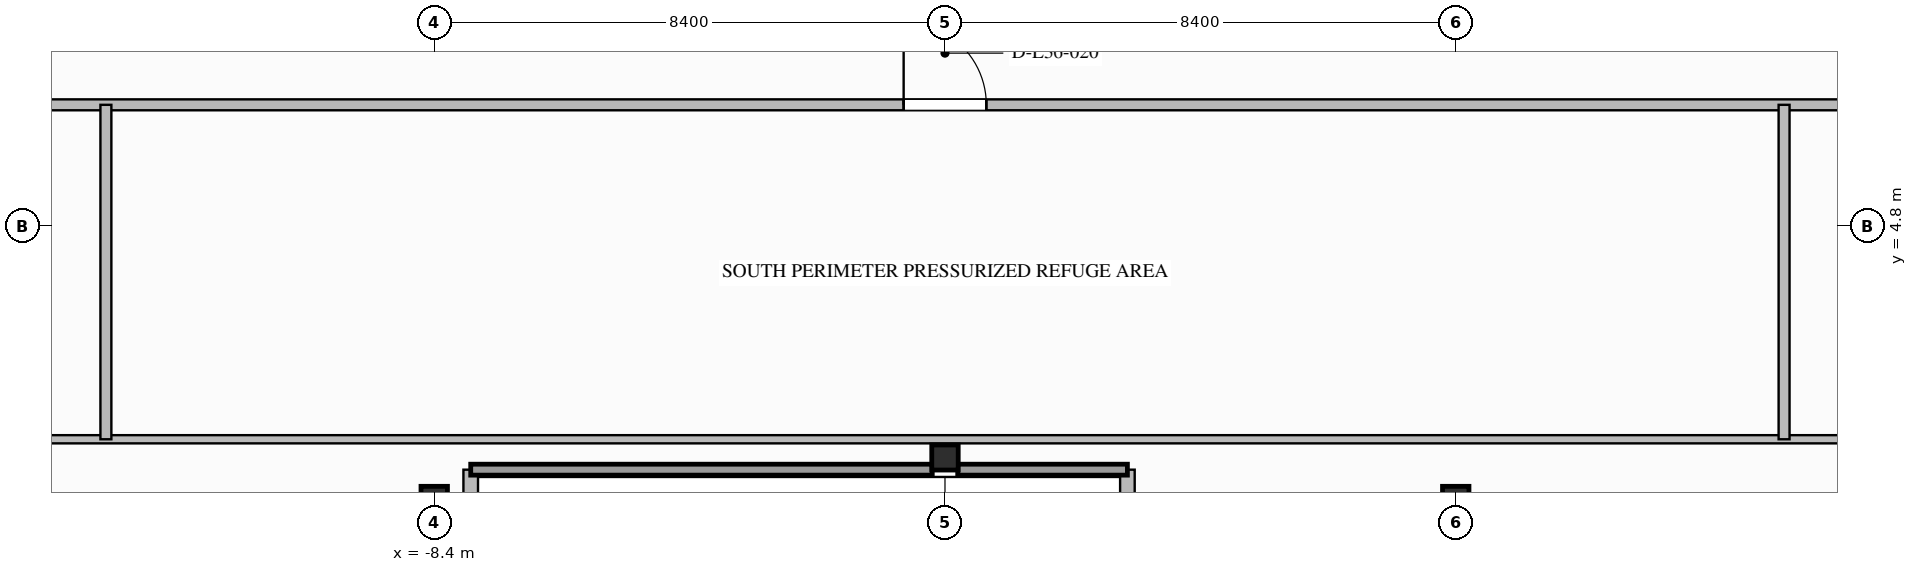
"""IFC4 building model, lengths in metres.
Left out: names, types, materials, properties, quantities, classifications, styles, units other than length and angle.
Written with IfcOpenShell. Run it as: python <this file> out.ifc"""

import sys

from ifc_helpers import new_model, si_unit, direction, frame, frame_2d, origin, origin_2d, place, context, subcontext, project, spatial, rectangle, i_section, extrude, element, fill, save


model = new_model("IFC4")
c1 = context("Model", 3, precision=1e-05, world=origin(), true_north=direction((0.0, 1.0)))
c2 = subcontext(c1, "Body", "Model", "MODEL_VIEW")
j1 = project(units=[si_unit("LENGTHUNIT", "METRE"), si_unit("PLANEANGLEUNIT", "RADIAN")], contexts=[c1])
p1 = place(None, origin())
s1 = spatial("IfcSite", under=j1, at=p1, CompositionType="ELEMENT")
p2 = place(p1, origin())
s2 = spatial("IfcBuilding", under=s1, at=p2, CompositionType="ELEMENT")
p3 = place(p2, frame((0.0, 0.0, 140.8)))
s3 = spatial("IfcBuildingStorey", under=s2, at=p3, CompositionType="ELEMENT", Elevation=140.8)
for number, where, z_axis, x_axis in (
    (1, (-8.4, 0.32, 0.0), (0.0, 0.0, 1.0), (0.0, 1.0, 0.0)),
    (2, (0.0, 1.0, 0.0), (0.0, 0.0, 1.0), (0.0, 1.0, 0.0)),
    (3, (8.4, 0.32, 0.0), (0.0, 0.0, 1.0), (0.0, 1.0, 0.0)),
):
    element("IfcColumn", number, at=place(p3, frame(where, z_axis=z_axis, x_axis=x_axis)), inside=s3, PredefinedType="COLUMN", context=c2, shape_type="SweptSolid", body=[
        extrude(i_section(OverallWidth=0.412, OverallDepth=0.435, WebThickness=0.036, FlangeThickness=0.057, FilletRadius=0.028, at=origin_2d()), origin(), (0.0, 0.0, 1.0), 4.997),
    ])
for number, where, z_axis, x_axis in (
    (4, (3.0, 0.12, 0.0), (0.0, 0.0, 1.0), (0.0, 1.0, 0.0)),
    (5, (-7.8, 0.8, 0.0), (0.0, 0.0, 1.0), (0.0, -1.0, 0.0)),
):
    element("IfcWall", number, at=place(p3, frame(where, z_axis=z_axis, x_axis=x_axis)), inside=s3, PredefinedType="STANDARD", context=c2, shape_type="SweptSolid", body=[
        extrude(rectangle(XDim=0.68, YDim=0.24, at=frame_2d((0.34, 0.0))), origin(), (0.0, 0.0, 1.0), 4.7),
    ])
p4 = place(p3, frame((-19.95, 1.3, 0.0), z_axis=(0.0, 0.0, 1.0), x_axis=(1.0, 0.0, 0.0)))
e6 = element("IfcWall", 6, at=p4, inside=s3, PredefinedType="PARTITIONING", context=c2, shape_type="SweptSolid", body=[
    extrude(rectangle(XDim=37.53, YDim=0.135, at=frame_2d((18.765, 0.0))), origin(), (0.0, 0.0, 1.0), 4.074),
])
p5 = place(p3, frame((-19.95, 6.8, 0.0), z_axis=(0.0, 0.0, 1.0), x_axis=(1.0, 0.0, 0.0)))
e7 = element("IfcWall", 7, at=p5, inside=s3, PredefinedType="SOLIDWALL", context=c2, shape_type="SweptSolid", body=[
    extrude(rectangle(XDim=39.9, YDim=0.18, at=frame_2d((19.95, 0.0))), origin(), (0.0, 0.0, 1.0), 4.7),
])
p6 = place(p5, frame((19.27, 0.0, 0.0)))
e8 = element("IfcOpeningElement", 8, at=p6, cuts=e7, PredefinedType="OPENING", context=c2, shape_type="SweptSolid", body=[
    extrude(rectangle(XDim=1.36, YDim=2.2, at=frame_2d((0.68, 1.1))), frame((0.0, 0.1, 0.0), z_axis=(0.0, -1.0, 0.0), x_axis=(1.0, 0.0, 0.0)), (0.0, 0.0, 1.0), 0.2),
])
for number, where, z_axis, x_axis in (
    (9, (-13.8, 1.3, 0.0), (0.0, 0.0, 1.0), (0.0, 1.0, 0.0)),
    (10, (13.8, 1.3, 0.0), (0.0, 0.0, 1.0), (0.0, 1.0, 0.0)),
):
    element("IfcWall", number, at=place(p3, frame(where, z_axis=z_axis, x_axis=x_axis)), inside=s3, PredefinedType="SOLIDWALL", context=c2, shape_type="SweptSolid", body=[
        extrude(rectangle(XDim=5.5, YDim=0.18, at=frame_2d((2.75, 0.0))), origin(), (0.0, 0.0, 1.0), 4.7),
    ])
p7 = place(p6, origin())
e11 = element("IfcDoor", 11, at=p7, inside=s3, OperationType="SINGLE_SWING_LEFT", PredefinedType="DOOR", context=c2, shape_type="SweptSolid", body=[
    extrude(rectangle(XDim=1.36, YDim=2.2, at=frame_2d((0.68, 1.1))), frame((0.0, 0.025, 0.0), z_axis=(0.0, -1.0, 0.0), x_axis=(1.0, 0.0, 0.0)), (0.0, 0.0, 1.0), 0.05),
])
fill(e8, e11)
save(model, sys.argv[1])
